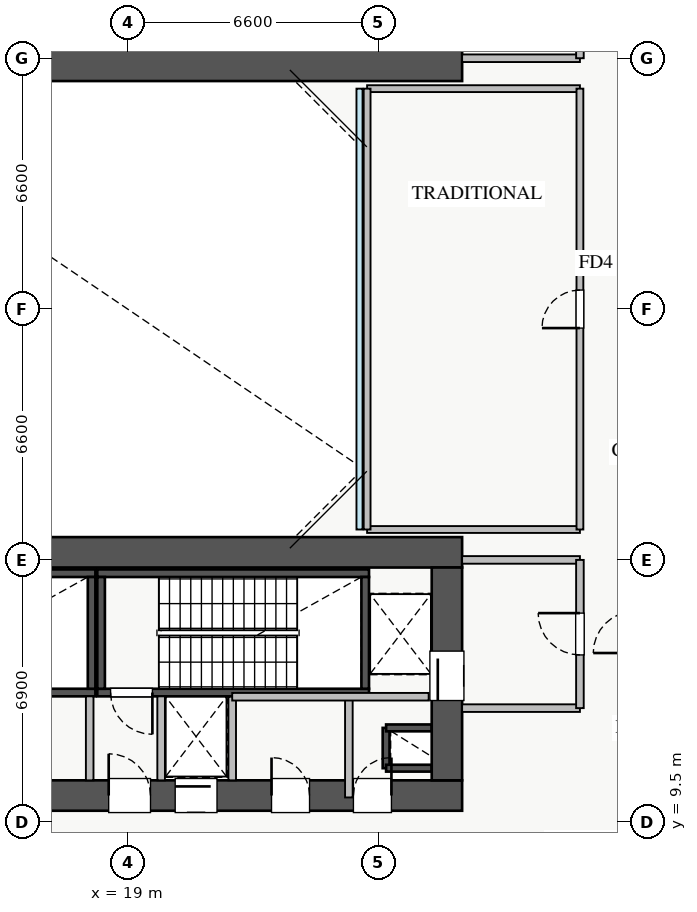
"""IFC4 building model, lengths in metres.
Left out: names, types, materials, properties, quantities, classifications, styles, units other than length and angle.
Written with IfcOpenShell. Run it as: python <this file> out.ifc"""

import sys

from ifc_helpers import new_model, si_unit, direction, frame, frame_2d, origin, place, context, subcontext, project, spatial, rectangle, extrude, source, transform, mapped, element, fill, save


model = new_model("IFC4")
c1 = context("Model", 3, precision=1e-05, world=origin(), true_north=direction((0.0, 1.0)))
c2 = subcontext(c1, "Body", "Model", "MODEL_VIEW")
j1 = project(units=[si_unit("LENGTHUNIT", "METRE"), si_unit("PLANEANGLEUNIT", "RADIAN")], contexts=[c1])
p1 = place(None, origin())
s1 = spatial("IfcSite", under=j1, at=p1, CompositionType="ELEMENT")
p2 = place(p1, origin())
s2 = spatial("IfcBuilding", under=s1, at=p2, CompositionType="ELEMENT")
p3 = place(p2, frame((0.0, 0.0, 18.2)))
s3 = spatial("IfcBuildingStorey", under=s2, at=p3, CompositionType="ELEMENT", Elevation=18.2)
p4 = place(p3, frame((25.8, 10.92, 0.0), z_axis=(0.0, 0.0, 1.0), x_axis=(0.0, 1.0, 0.0)))
e1 = element("IfcWall", 1, at=p4, inside=s3, PredefinedType="SHEAR", context=c2, shape_type="SweptSolid", body=[
    extrude(rectangle(XDim=1.06, YDim=0.18, at=frame_2d((0.53, 0.0))), origin(), (0.0, 0.0, 1.0), 4.62),
])
for number, where, z_axis, x_axis in (
    (2, (25.8, 11.98, 0.0), (0.0, 0.0, 1.0), (1.0, 0.0, 0.0)),
    (3, (25.8, 10.92, 0.0), (0.0, 0.0, 1.0), (1.0, 0.0, 0.0)),
):
    element("IfcWall", number, at=place(p3, frame(where, z_axis=z_axis, x_axis=x_axis)), inside=s3, PredefinedType="SHEAR", context=c2, shape_type="SweptSolid", body=[
        extrude(rectangle(XDim=1.2, YDim=0.18, at=frame_2d((0.6, 0.0))), origin(), (0.0, 0.0, 1.0), 4.62),
    ])
p5 = place(p3, frame((19.88, 12.8, 0.0), z_axis=(0.0, 0.0, 1.0), x_axis=(1.0, 0.0, 0.0)))
e4 = element("IfcWall", 4, at=p5, inside=s3, PredefinedType="SHEAR", context=c2, shape_type="SweptSolid", body=[
    extrude(rectangle(XDim=1.87, YDim=0.18, at=frame_2d((0.935, 0.0))), origin(), (0.0, 0.0, 1.0), 4.62),
])
p6 = place(p3, frame((11.0, 12.91, 0.0), z_axis=(0.0, 0.0, 1.0), x_axis=(1.0, 0.0, 0.0)))
e5 = element("IfcWall", 5, at=p6, inside=s3, PredefinedType="SHEAR", context=c2, shape_type="SweptSolid", body=[
    extrude(rectangle(XDim=7.15, YDim=0.2, at=frame_2d((3.575, 0.0))), origin(), (0.0, 0.0, 1.0), 4.8),
])
p7 = place(p6, frame((0.35, 0.0, 0.0)))
e6 = element("IfcOpeningElement", 6, at=p7, cuts=e5, PredefinedType="OPENING", context=c2, shape_type="SweptSolid", body=[
    extrude(rectangle(XDim=1.1, YDim=2.05, at=frame_2d((0.55, 1.025))), frame((0.0, 0.11, 0.0), z_axis=(0.0, -1.0, 0.0), x_axis=(1.0, 0.0, 0.0)), (0.0, 0.0, 1.0), 0.22),
])
p8 = place(p3, frame((11.0, 16.05, 0.0), z_axis=(0.0, 0.0, 1.0), x_axis=(1.0, 0.0, 0.0)))
e7 = element("IfcWall", 7, at=p8, inside=s3, PredefinedType="SHEAR", context=c2, shape_type="SweptSolid", body=[
    extrude(rectangle(XDim=7.15, YDim=0.2, at=frame_2d((3.575, 0.0))), origin(), (0.0, 0.0, 1.0), 4.8),
])
p9 = place(p3, frame((18.05, 13.01, 0.0), z_axis=(0.0, 0.0, 1.0), x_axis=(0.0, 1.0, 0.0)))
e8 = element("IfcWall", 8, at=p9, inside=s3, PredefinedType="SHEAR", context=c2, shape_type="SweptSolid", body=[
    extrude(rectangle(XDim=2.94, YDim=0.2, at=frame_2d((1.47, 0.0))), origin(), (0.0, 0.0, 1.0), 4.8),
])
p10 = place(p3, frame((18.2, 12.91, 0.0), z_axis=(0.0, 0.0, 1.0), x_axis=(1.0, 0.0, 0.0)))
e9 = element("IfcWall", 9, at=p10, inside=s3, PredefinedType="SHEAR", context=c2, shape_type="SweptSolid", body=[
    extrude(rectangle(XDim=7.15, YDim=0.2, at=frame_2d((3.575, 0.0))), origin(), (0.0, 0.0, 1.0), 4.8),
])
p11 = place(p10, frame((0.35, 0.0, 0.0)))
e10 = element("IfcOpeningElement", 10, at=p11, cuts=e9, PredefinedType="OPENING", context=c2, shape_type="SweptSolid", body=[
    extrude(rectangle(XDim=1.1, YDim=2.05, at=frame_2d((0.55, 1.025))), frame((0.0, 0.11, 0.0), z_axis=(0.0, -1.0, 0.0), x_axis=(1.0, 0.0, 0.0)), (0.0, 0.0, 1.0), 0.22),
])
p12 = place(p3, frame((18.2, 16.05, 0.0), z_axis=(0.0, 0.0, 1.0), x_axis=(1.0, 0.0, 0.0)))
e11 = element("IfcWall", 11, at=p12, inside=s3, PredefinedType="SHEAR", context=c2, shape_type="SweptSolid", body=[
    extrude(rectangle(XDim=7.15, YDim=0.2, at=frame_2d((3.575, 0.0))), origin(), (0.0, 0.0, 1.0), 4.8),
])
for number, where, z_axis, x_axis in (
    (12, (18.3, 13.01, 0.0), (0.0, 0.0, 1.0), (0.0, 1.0, 0.0)),
    (13, (25.25, 13.01, 0.0), (0.0, 0.0, 1.0), (0.0, 1.0, 0.0)),
):
    element("IfcWall", number, at=place(p3, frame(where, z_axis=z_axis, x_axis=x_axis)), inside=s3, PredefinedType="SHEAR", context=c2, shape_type="SweptSolid", body=[
        extrude(rectangle(XDim=2.94, YDim=0.2, at=frame_2d((1.47, 0.0))), origin(), (0.0, 0.0, 1.0), 4.8),
    ])
p13 = place(p3, frame((10.2, 29.4, 0.0), z_axis=(0.0, 0.0, 1.0), x_axis=(1.0, 0.0, 0.0)))
e14 = element("IfcWall", 14, at=p13, inside=s3, PredefinedType="SHEAR", context=c2, shape_type="SweptSolid", body=[
    extrude(rectangle(XDim=17.6, YDim=0.8, at=frame_2d((8.8, 0.0))), origin(), (0.0, 0.0, 1.0), 4.8),
])
p14 = place(p3, frame((10.2, 10.2, 0.0), z_axis=(0.0, 0.0, 1.0), x_axis=(1.0, 0.0, 0.0)))
e15 = element("IfcWall", 15, at=p14, inside=s3, PredefinedType="SHEAR", context=c2, shape_type="SweptSolid", body=[
    extrude(rectangle(XDim=17.6, YDim=0.8, at=frame_2d((8.8, 0.0))), origin(), (0.0, 0.0, 1.0), 4.8),
])
p15 = place(p14, frame((1.15, 0.0, 0.0)))
e16 = element("IfcOpeningElement", 16, at=p15, cuts=e15, PredefinedType="OPENING", context=c2, shape_type="SweptSolid", body=[
    extrude(rectangle(XDim=1.1, YDim=2.05, at=frame_2d((0.55, 1.025))), frame((0.0, 0.41, 0.0), z_axis=(0.0, -1.0, 0.0), x_axis=(1.0, 0.0, 0.0)), (0.0, 0.0, 1.0), 0.82),
])
p16 = place(p14, frame((8.3, 0.0, 0.0)))
e17 = element("IfcOpeningElement", 17, at=p16, cuts=e15, PredefinedType="OPENING", context=c2, shape_type="SweptSolid", body=[
    extrude(rectangle(XDim=1.1, YDim=2.05, at=frame_2d((0.55, 1.025))), frame((0.0, 0.41, 0.0), z_axis=(0.0, -1.0, 0.0), x_axis=(1.0, 0.0, 0.0)), (0.0, 0.0, 1.0), 0.82),
])
p17 = place(p14, frame((10.05, 0.0, 0.0)))
e18 = element("IfcOpeningElement", 18, at=p17, cuts=e15, PredefinedType="OPENING", context=c2, shape_type="SweptSolid", body=[
    extrude(rectangle(XDim=1.1, YDim=2.05, at=frame_2d((0.55, 1.025))), frame((0.0, 0.41, 0.0), z_axis=(0.0, -1.0, 0.0), x_axis=(1.0, 0.0, 0.0)), (0.0, 0.0, 1.0), 0.82),
])
p18 = place(p14, frame((14.74, 0.0, 0.0)))
e19 = element("IfcOpeningElement", 19, at=p18, cuts=e15, PredefinedType="OPENING", context=c2, shape_type="SweptSolid", body=[
    extrude(rectangle(XDim=1.0, YDim=2.05, at=frame_2d((0.5, 1.025))), frame((0.0, 0.41, 0.0), z_axis=(0.0, -1.0, 0.0), x_axis=(1.0, 0.0, 0.0)), (0.0, 0.0, 1.0), 0.82),
])
p19 = place(p14, frame((12.585, 0.0, 0.0)))
e20 = element("IfcOpeningElement", 20, at=p19, cuts=e15, PredefinedType="OPENING", context=c2, shape_type="SweptSolid", body=[
    extrude(rectangle(XDim=1.0, YDim=2.05, at=frame_2d((0.5, 1.025))), frame((0.0, 0.41, 0.0), z_axis=(0.0, -1.0, 0.0), x_axis=(1.0, 0.0, 0.0)), (0.0, 0.0, 1.0), 0.82),
])
p20 = place(p3, frame((10.2, 16.6, 0.0), z_axis=(0.0, 0.0, 1.0), x_axis=(1.0, 0.0, 0.0)))
e21 = element("IfcWall", 21, at=p20, inside=s3, PredefinedType="SHEAR", context=c2, shape_type="SweptSolid", body=[
    extrude(rectangle(XDim=17.6, YDim=0.8, at=frame_2d((8.8, 0.0))), origin(), (0.0, 0.0, 1.0), 4.8),
])
p21 = place(p3, frame((27.4, 10.6, 0.0), z_axis=(0.0, 0.0, 1.0), x_axis=(0.0, 1.0, 0.0)))
e22 = element("IfcWall", 22, at=p21, inside=s3, PredefinedType="SHEAR", context=c2, shape_type="SweptSolid", body=[
    extrude(rectangle(XDim=5.6, YDim=0.8, at=frame_2d((2.8, 0.0))), origin(), (0.0, 0.0, 1.0), 4.8),
])
p22 = place(p21, frame((2.1, 0.0, 0.0)))
e23 = element("IfcOpeningElement", 23, at=p22, cuts=e22, PredefinedType="OPENING", context=c2, shape_type="SweptSolid", body=[
    extrude(rectangle(XDim=1.3, YDim=2.05, at=frame_2d((0.65, 1.025))), frame((0.0, 0.41, 0.0), z_axis=(0.0, -1.0, 0.0), x_axis=(1.0, 0.0, 0.0)), (0.0, 0.0, 1.0), 0.82),
])
p23 = place(p3, frame((27.8, 29.6, 0.0), z_axis=(0.0, 0.0, 1.0), x_axis=(1.0, 0.0, 0.0)))
e24 = element("IfcWall", 24, at=p23, inside=s3, PredefinedType="PARTITIONING", context=c2, shape_type="SweptSolid", body=[
    extrude(rectangle(XDim=3.1, YDim=0.2, at=frame_2d((1.55, 0.0))), origin(), (0.0, 0.0, 1.0), 3.915),
])
p24 = place(p3, frame((30.9, 29.6, 0.0), z_axis=(0.0, 0.0, 1.0), x_axis=(0.0, 1.0, 0.0)))
e25 = element("IfcWall", 25, at=p24, inside=s3, PredefinedType="PARTITIONING", context=c2, shape_type="SweptSolid", body=[
    extrude(rectangle(XDim=3.9, YDim=0.2, at=frame_2d((1.95, 0.0))), origin(), (0.0, 0.0, 1.0), 4.62),
])
p25 = place(p24, frame((1.4, 0.0, 0.0)))
e26 = element("IfcOpeningElement", 26, at=p25, cuts=e25, PredefinedType="OPENING", context=c2, shape_type="SweptSolid", body=[
    extrude(rectangle(XDim=1.1, YDim=2.05, at=frame_2d((0.55, 1.025))), frame((0.0, 0.11, 0.0), z_axis=(0.0, -1.0, 0.0), x_axis=(1.0, 0.0, 0.0)), (0.0, 0.0, 1.0), 0.22),
])
for number, where, z_axis, x_axis in (
    (27, (27.8, 16.4, 0.0), (0.0, 0.0, 1.0), (1.0, 0.0, 0.0)),
    (28, (27.8, 12.5, 0.0), (0.0, 0.0, 1.0), (1.0, 0.0, 0.0)),
):
    element("IfcWall", number, at=place(p3, frame(where, z_axis=z_axis, x_axis=x_axis)), inside=s3, PredefinedType="PARTITIONING", context=c2, shape_type="SweptSolid", body=[
        extrude(rectangle(XDim=3.1, YDim=0.2, at=frame_2d((1.55, 0.0))), origin(), (0.0, 0.0, 1.0), 3.915),
    ])
p26 = place(p3, frame((30.9, 12.5, 0.0), z_axis=(0.0, 0.0, 1.0), x_axis=(0.0, 1.0, 0.0)))
e29 = element("IfcWall", 29, at=p26, inside=s3, PredefinedType="PARTITIONING", context=c2, shape_type="SweptSolid", body=[
    extrude(rectangle(XDim=3.9, YDim=0.2, at=frame_2d((1.95, 0.0))), origin(), (0.0, 0.0, 1.0), 4.62),
])
p27 = place(p26, frame((1.4, 0.0, 0.0)))
e30 = element("IfcOpeningElement", 30, at=p27, cuts=e29, PredefinedType="OPENING", context=c2, shape_type="SweptSolid", body=[
    extrude(rectangle(XDim=1.1, YDim=2.05, at=frame_2d((0.55, 1.025))), frame((0.0, 0.11, 0.0), z_axis=(0.0, -1.0, 0.0), x_axis=(1.0, 0.0, 0.0)), (0.0, 0.0, 1.0), 0.22),
])
for number, where, z_axis, x_axis in (
    (31, (18.0, 10.6, 0.0), (0.0, 0.0, 1.0), (0.0, 1.0, 0.0)),
    (32, (19.88, 10.6, 0.0), (0.0, 0.0, 1.0), (0.0, 1.0, 0.0)),
):
    element("IfcWall", number, at=place(p3, frame(where, z_axis=z_axis, x_axis=x_axis)), inside=s3, PredefinedType="PARTITIONING", context=c2, shape_type="SweptSolid", body=[
        extrude(rectangle(XDim=2.21, YDim=0.2, at=frame_2d((1.105, 0.0))), origin(), (0.0, 0.0, 1.0), 4.62),
    ])
p28 = place(p3, frame((24.82, 10.15, 0.0), z_axis=(0.0, 0.0, 1.0), x_axis=(0.0, 1.0, 0.0)))
e33 = element("IfcWall", 33, at=p28, inside=s3, PredefinedType="PARTITIONING", context=c2, shape_type="SweptSolid", body=[
    extrude(rectangle(XDim=2.65, YDim=0.2, at=frame_2d((1.325, 0.0))), origin(), (0.0, 0.0, 1.0), 4.62),
])
p29 = place(p3, frame((21.75, 10.6, 0.0), z_axis=(0.0, 0.0, 1.0), x_axis=(0.0, 1.0, 0.0)))
e34 = element("IfcWall", 34, at=p29, inside=s3, PredefinedType="PARTITIONING", context=c2, shape_type="SweptSolid", body=[
    extrude(rectangle(XDim=2.2, YDim=0.2, at=frame_2d((1.1, 0.0))), origin(), (0.0, 0.0, 1.0), 4.62),
])
p30 = place(p3, frame((21.75, 12.8, 0.0), z_axis=(0.0, 0.0, 1.0), x_axis=(1.0, 0.0, 0.0)))
e35 = element("IfcWall", 35, at=p30, inside=s3, PredefinedType="PARTITIONING", context=c2, shape_type="SweptSolid", body=[
    extrude(rectangle(XDim=5.17, YDim=0.2, at=frame_2d((2.585, 0.0))), origin(), (0.0, 0.0, 1.0), 4.62),
])
for number, where, z_axis, x_axis in (
    (36, (25.3, 17.2, 0.0), (0.0, 0.0, 1.0), (1.0, 0.0, 0.0)),
    (37, (25.3, 28.8, 0.0), (0.0, 0.0, 1.0), (1.0, 0.0, 0.0)),
):
    element("IfcWall", number, at=place(p3, frame(where, z_axis=z_axis, x_axis=x_axis)), inside=s3, PredefinedType="PARTITIONING", context=c2, shape_type="SweptSolid", body=[
        extrude(rectangle(XDim=5.6, YDim=0.18, at=frame_2d((2.8, 0.0))), origin(), (0.0, 0.0, 1.0), 4.62),
    ])
p31 = place(p3, frame((25.3, 17.2, 0.0), z_axis=(0.0, 0.0, 1.0), x_axis=(0.0, 1.0, 0.0)))
e38 = element("IfcWall", 38, at=p31, inside=s3, PredefinedType="PARTITIONING", context=c2, shape_type="SweptSolid", body=[
    extrude(rectangle(XDim=11.6, YDim=0.18, at=frame_2d((5.8, 0.0))), origin(), (0.0, 0.0, 1.0), 4.62),
])
p32 = place(p3, frame((30.9, 17.2, 0.0), z_axis=(0.0, 0.0, 1.0), x_axis=(0.0, 1.0, 0.0)))
e39 = element("IfcWall", 39, at=p32, inside=s3, PredefinedType="PARTITIONING", context=c2, shape_type="SweptSolid", body=[
    extrude(rectangle(XDim=11.6, YDim=0.18, at=frame_2d((5.8, 0.0))), origin(), (0.0, 0.0, 1.0), 4.62),
])
p33 = place(p32, frame((5.3, 0.0, 0.0)))
e40 = element("IfcOpeningElement", 40, at=p33, cuts=e39, PredefinedType="OPENING", context=c2, shape_type="SweptSolid", body=[
    extrude(rectangle(XDim=1.0, YDim=2.05, at=frame_2d((0.5, 1.025))), frame((0.0, 0.1, 0.0), z_axis=(0.0, -1.0, 0.0), x_axis=(1.0, 0.0, 0.0)), (0.0, 0.0, 1.0), 0.2),
])
m1 = source(origin(), c2, "Body", "SweptSolid", [
    extrude(rectangle(XDim=1.3, YDim=2.05, at=frame_2d((0.65, 1.025))), frame((0.0, 0.025, 0.0), z_axis=(0.0, -1.0, 0.0), x_axis=(1.0, 0.0, 0.0)), (0.0, 0.0, 1.0), 0.05),
])
p34 = place(p22, origin())
e41 = element("IfcDoor", 41, at=p34, inside=s3, OperationType="SLIDING_TO_RIGHT", PredefinedType="DOOR", context=c2, shape_type="MappedRepresentation", body=[
    mapped(m1, transform((0.0, 0.0, 0.0), x_axis=(1.0, 0.0, 0.0), y_axis=(0.0, 1.0, 0.0), z_axis=(0.0, 0.0, 1.0), scale=1.0)),
])
fill(e23, e41)
m2 = source(origin(), c2, "Body", "SweptSolid", [
    extrude(rectangle(XDim=1.1, YDim=2.05, at=frame_2d((0.55, 1.025))), frame((0.0, 0.025, 0.0), z_axis=(0.0, -1.0, 0.0), x_axis=(1.0, 0.0, 0.0)), (0.0, 0.0, 1.0), 0.05),
])
p35 = place(p16, origin())
e42 = element("IfcDoor", 42, at=p35, inside=s3, OperationType="SINGLE_SWING_LEFT", PredefinedType="DOOR", context=c2, shape_type="MappedRepresentation", body=[
    mapped(m2, transform((0.0, 0.0, 0.0), x_axis=(1.0, 0.0, 0.0), y_axis=(0.0, 1.0, 0.0), z_axis=(0.0, 0.0, 1.0), scale=1.0)),
])
fill(e17, e42)
p36 = place(p11, frame((1.1, 0.0, 0.0), z_axis=(0.0, 0.0, 1.0), x_axis=(-1.0, 0.0, 0.0)))
e43 = element("IfcDoor", 43, at=p36, inside=s3, OperationType="SINGLE_SWING_RIGHT", PredefinedType="DOOR", context=c2, shape_type="MappedRepresentation", body=[
    mapped(m2, transform((0.0, 0.0, 0.0), x_axis=(1.0, 0.0, 0.0), y_axis=(0.0, 1.0, 0.0), z_axis=(0.0, 0.0, 1.0), scale=1.0)),
])
fill(e10, e43)
p37 = place(p17, origin())
e44 = element("IfcDoor", 44, at=p37, inside=s3, OperationType="SLIDING_TO_RIGHT", PredefinedType="DOOR", context=c2, shape_type="MappedRepresentation", body=[
    mapped(m2, transform((0.0, 0.0, 0.0), x_axis=(1.0, 0.0, 0.0), y_axis=(0.0, 1.0, 0.0), z_axis=(0.0, 0.0, 1.0), scale=1.0)),
])
fill(e18, e44)
m3 = source(origin(), c2, "Body", "SweptSolid", [
    extrude(rectangle(XDim=1.0, YDim=2.05, at=frame_2d((0.5, 1.025))), frame((0.0, 0.025, 0.0), z_axis=(0.0, -1.0, 0.0), x_axis=(1.0, 0.0, 0.0)), (0.0, 0.0, 1.0), 0.05),
])
p38 = place(p18, origin())
e45 = element("IfcDoor", 45, at=p38, inside=s3, OperationType="SINGLE_SWING_RIGHT", PredefinedType="DOOR", context=c2, shape_type="MappedRepresentation", body=[
    mapped(m3, transform((0.0, 0.0, 0.0), x_axis=(1.0, 0.0, 0.0), y_axis=(0.0, 1.0, 0.0), z_axis=(0.0, 0.0, 1.0), scale=1.0)),
])
fill(e19, e45)
p39 = place(p19, origin())
e46 = element("IfcDoor", 46, at=p39, inside=s3, OperationType="SINGLE_SWING_LEFT", PredefinedType="DOOR", context=c2, shape_type="MappedRepresentation", body=[
    mapped(m3, transform((0.0, 0.0, 0.0), x_axis=(1.0, 0.0, 0.0), y_axis=(0.0, 1.0, 0.0), z_axis=(0.0, 0.0, 1.0), scale=1.0)),
])
fill(e20, e46)
p40 = place(p27, origin())
e47 = element("IfcDoor", 47, at=p40, inside=s3, OperationType="SINGLE_SWING_RIGHT", PredefinedType="DOOR", context=c2, shape_type="MappedRepresentation", body=[
    mapped(m2, transform((0.0, 0.0, 0.0), x_axis=(1.0, 0.0, 0.0), y_axis=(0.0, 1.0, 0.0), z_axis=(0.0, 0.0, 1.0), scale=1.0)),
])
fill(e30, e47)
p41 = place(p33, origin())
e48 = element("IfcDoor", 48, at=p41, inside=s3, OperationType="SINGLE_SWING_LEFT", PredefinedType="DOOR", context=c2, shape_type="MappedRepresentation", body=[
    mapped(m3, transform((0.0, 0.0, 0.0), x_axis=(1.0, 0.0, 0.0), y_axis=(0.0, 1.0, 0.0), z_axis=(0.0, 0.0, 1.0), scale=1.0)),
])
fill(e40, e48)
save(model, sys.argv[1])
